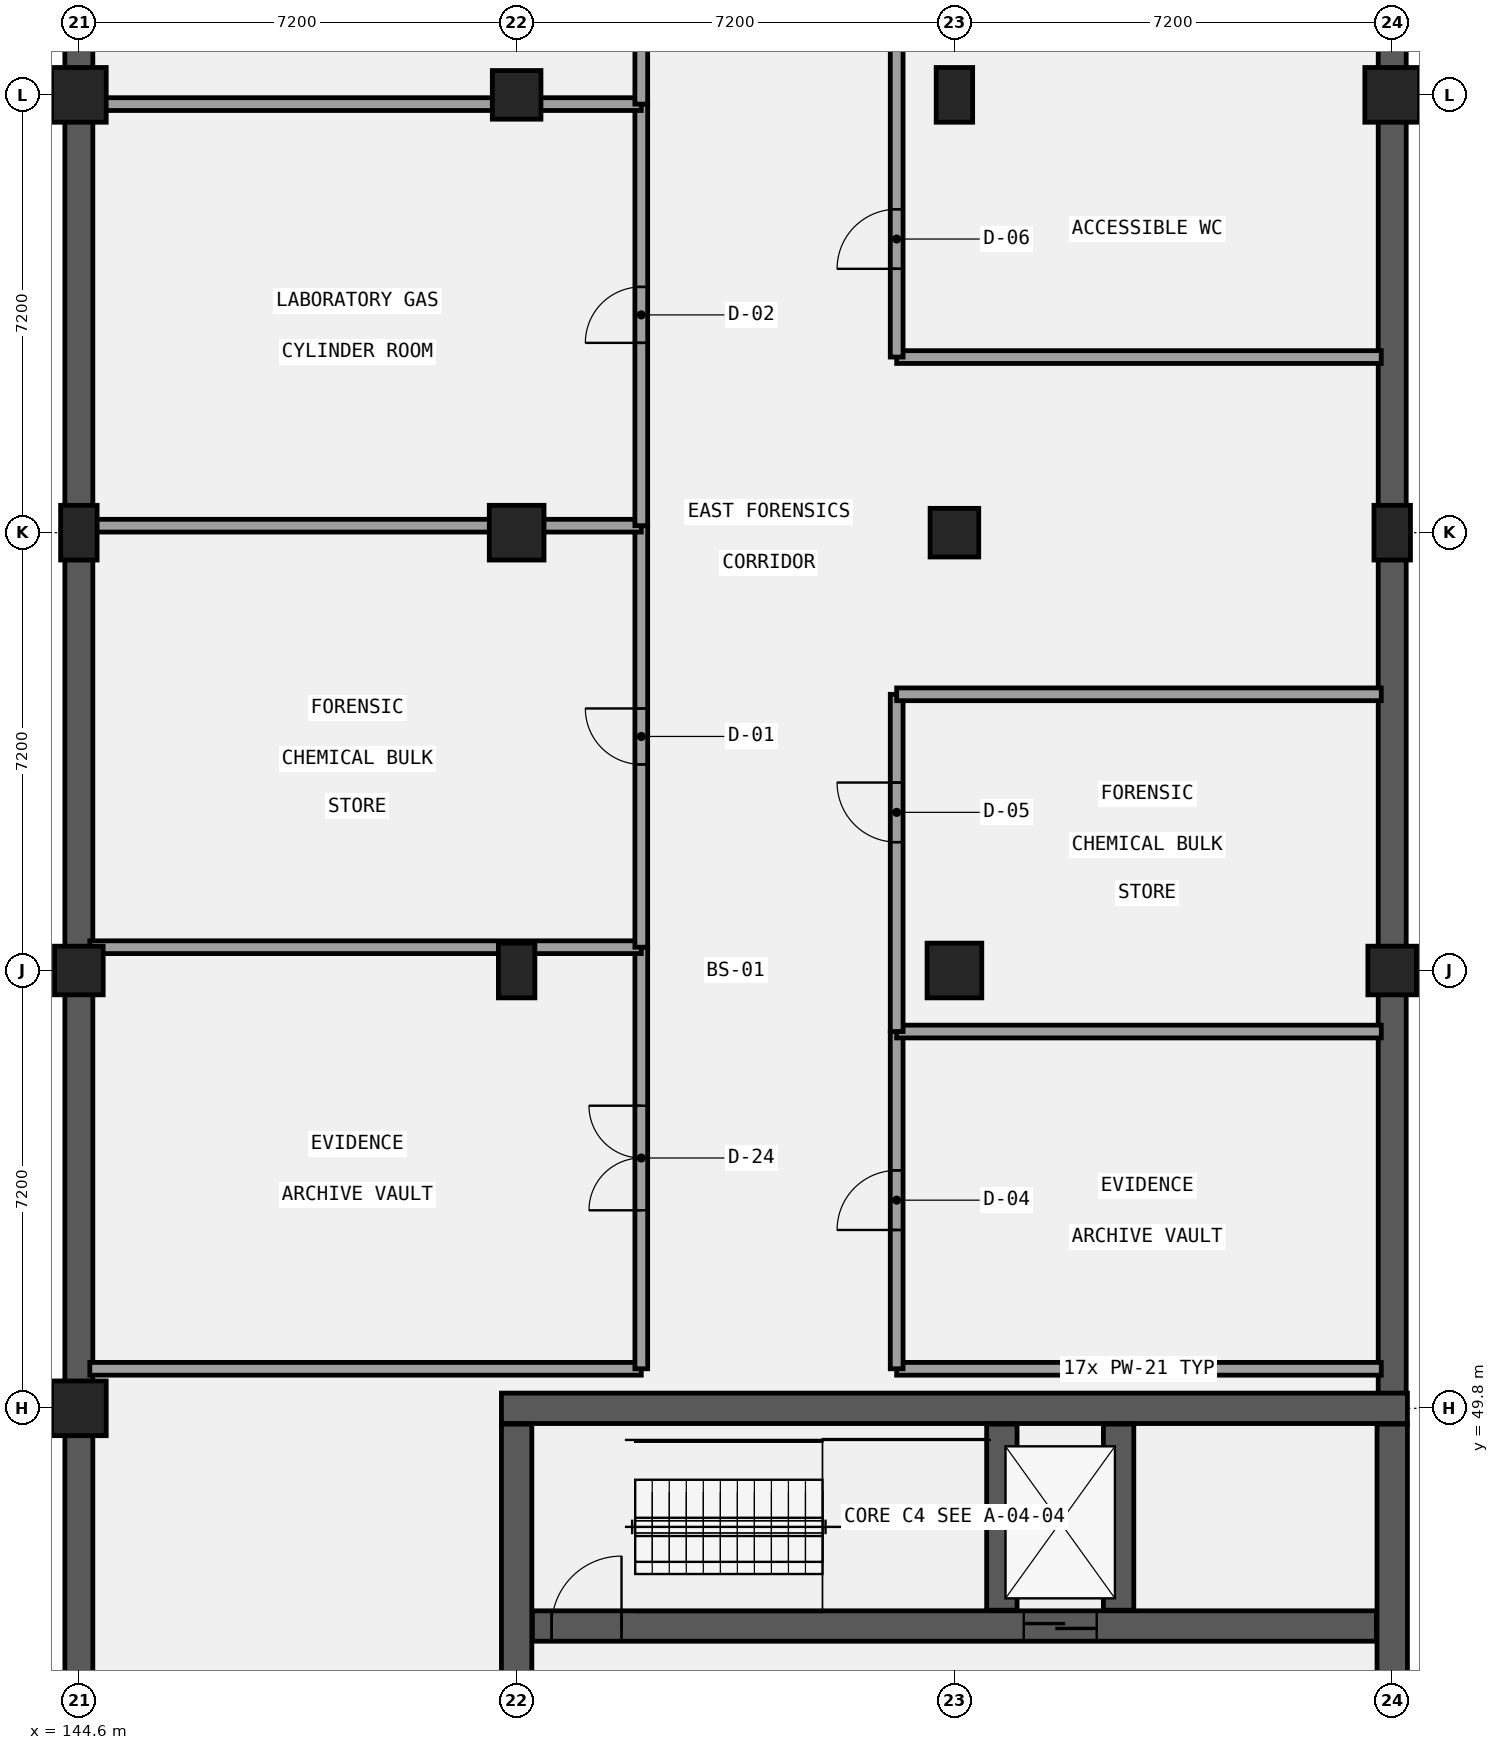
"""IFC4 building model, lengths in metres.
Left out: names, types, materials, properties, quantities, classifications, styles, units other than length and angle.
Written with IfcOpenShell. Run it as: python <this file> out.ifc"""

import sys

from ifc_helpers import new_model, si_unit, direction, frame, frame_2d, origin, origin_2d, place, context, subcontext, project, spatial, rectangle, extrude, element, fill, save


model = new_model("IFC4")
c1 = context("Model", 3, precision=1e-05, world=origin(), true_north=direction((0.0, 1.0)))
c2 = subcontext(c1, "Body", "Model", "MODEL_VIEW")
j1 = project(units=[si_unit("LENGTHUNIT", "METRE"), si_unit("PLANEANGLEUNIT", "RADIAN")], contexts=[c1])
p1 = place(None, origin())
s1 = spatial("IfcSite", under=j1, at=p1, CompositionType="ELEMENT")
p2 = place(p1, origin())
s2 = spatial("IfcBuilding", under=s1, at=p2, CompositionType="ELEMENT")
p3 = place(p2, frame((0.0, 0.0, -8.4)))
s3 = spatial("IfcBuildingStorey", under=s2, at=p3, CompositionType="ELEMENT", Elevation=-8.4)
p4 = place(p3, frame((166.2, 78.38, 0.0), z_axis=(0.0, 0.0, 1.0), x_axis=(0.0, -1.0, 0.0)))
e1 = element("IfcWall", 1, at=p4, inside=s3, PredefinedType="USERDEFINED", context=c2, shape_type="SweptSolid", body=[
    extrude(rectangle(XDim=28.35, YDim=0.46, at=frame_2d((14.175, 0.0))), origin(), (0.0, 0.0, 1.0), 2.9),
])
p5 = place(p3, frame((144.6, 35.62, 0.0), z_axis=(0.0, 0.0, 1.0), x_axis=(0.0, 1.0, 0.0)))
e2 = element("IfcWall", 2, at=p5, inside=s3, PredefinedType="USERDEFINED", context=c2, shape_type="SweptSolid", body=[
    extrude(rectangle(XDim=42.76, YDim=0.46, at=frame_2d((21.38, 0.0))), origin(), (0.0, 0.0, 1.0), 3.05),
])
p6 = place(p3, frame((151.55, 49.8, 0.0), z_axis=(0.0, 0.0, 1.0), x_axis=(1.0, 0.0, 0.0)))
e3 = element("IfcWall", 3, at=p6, inside=s3, PredefinedType="SHEAR", context=c2, shape_type="SweptSolid", body=[
    extrude(rectangle(XDim=14.9, YDim=0.5, at=frame_2d((7.45, 0.0))), origin(), (0.0, 0.0, 1.0), 4.2),
])
for number, where, z_axis, x_axis in (
    (4, (151.8, 42.86, 0.0), (0.0, 0.0, 1.0), (0.0, 1.0, 0.0)),
    (5, (166.2, 42.86, 0.0), (0.0, 0.0, 1.0), (0.0, 1.0, 0.0)),
):
    element("IfcWall", number, at=place(p3, frame(where, z_axis=z_axis, x_axis=x_axis)), inside=s3, PredefinedType="SHEAR", context=c2, shape_type="SweptSolid", body=[
        extrude(rectangle(XDim=6.68, YDim=0.5, at=frame_2d((3.34, 0.0))), origin(), (0.0, 0.0, 1.0), 4.2),
    ])
p7 = place(p3, frame((152.06, 46.22, 0.0), z_axis=(0.0, 0.0, 1.0), x_axis=(1.0, 0.0, 0.0)))
e6 = element("IfcWall", 6, at=p7, inside=s3, PredefinedType="SHEAR", context=c2, shape_type="SweptSolid", body=[
    extrude(rectangle(XDim=13.88, YDim=0.5, at=frame_2d((6.94, 0.0))), origin(), (0.0, 0.0, 1.0), 4.2),
])
p8 = place(p7, frame((8.08, 0.0, 0.0)))
e7 = element("IfcOpeningElement", 7, at=p8, cuts=e6, PredefinedType="OPENING", context=c2, shape_type="SweptSolid", body=[
    extrude(rectangle(XDim=1.2, YDim=2.15, at=frame_2d((0.6, 1.075))), frame((0.0, 0.26, 0.0), z_axis=(0.0, -1.0, 0.0), x_axis=(1.0, 0.0, 0.0)), (0.0, 0.0, 1.0), 0.52),
])
p9 = place(p7, frame((0.315, 0.0, 0.0)))
e8 = element("IfcOpeningElement", 8, at=p9, cuts=e6, PredefinedType="OPENING", context=c2, shape_type="SweptSolid", body=[
    extrude(rectangle(XDim=1.15, YDim=2.15, at=frame_2d((0.575, 1.075))), frame((0.0, 0.26, 0.0), z_axis=(0.0, -1.0, 0.0), x_axis=(1.0, 0.0, 0.0)), (0.0, 0.0, 1.0), 0.52),
])
for number, where, z_axis, x_axis in (
    (9, (159.78, 46.48, 0.0), (0.0, 0.0, 1.0), (0.0, 1.0, 0.0)),
    (10, (161.7, 46.48, 0.0), (0.0, 0.0, 1.0), (0.0, 1.0, 0.0)),
):
    element("IfcWall", number, at=place(p3, frame(where, z_axis=z_axis, x_axis=x_axis)), inside=s3, PredefinedType="SHEAR", context=c2, shape_type="SweptSolid", body=[
        extrude(rectangle(XDim=3.06, YDim=0.5, at=frame_2d((1.53, 0.0))), origin(), (0.0, 0.0, 1.0), 4.2),
    ])
p10 = place(p3, frame((144.6, 49.8, 0.0), z_axis=(0.0, 0.0, 1.0), x_axis=(1.0, 0.0, 0.0)))
e11 = element("IfcColumn", 11, at=p10, inside=s3, PredefinedType="COLUMN", context=c2, shape_type="SweptSolid", body=[
    extrude(rectangle(XDim=0.9, YDim=0.9, at=origin_2d()), origin(), (0.0, 0.0, 1.0), 4.2),
])
p11 = place(p3, frame((144.6, 57.0, 0.0), z_axis=(0.0, 0.0, 1.0), x_axis=(1.0, 0.0, 0.0)))
e12 = element("IfcColumn", 12, at=p11, inside=s3, PredefinedType="COLUMN", context=c2, shape_type="SweptSolid", body=[
    extrude(rectangle(XDim=0.8, YDim=0.8, at=origin_2d()), origin(), (0.0, 0.0, 1.0), 4.2),
])
p12 = place(p3, frame((144.6, 64.2, 0.0), z_axis=(0.0, 0.0, 1.0), x_axis=(1.0, 0.0, 0.0)))
e13 = element("IfcColumn", 13, at=p12, inside=s3, PredefinedType="COLUMN", context=c2, shape_type="SweptSolid", body=[
    extrude(rectangle(XDim=0.6, YDim=0.9, at=origin_2d()), origin(), (0.0, 0.0, 1.0), 4.2),
])
p13 = place(p3, frame((144.6, 71.4, 0.0), z_axis=(0.0, 0.0, 1.0), x_axis=(1.0, 0.0, 0.0)))
e14 = element("IfcColumn", 14, at=p13, inside=s3, PredefinedType="COLUMN", context=c2, shape_type="SweptSolid", body=[
    extrude(rectangle(XDim=0.9, YDim=0.9, at=origin_2d()), origin(), (0.0, 0.0, 1.0), 4.2),
])
p14 = place(p3, frame((151.8, 57.0, 0.0), z_axis=(0.0, 0.0, 1.0), x_axis=(1.0, 0.0, 0.0)))
e15 = element("IfcColumn", 15, at=p14, inside=s3, PredefinedType="COLUMN", context=c2, shape_type="SweptSolid", body=[
    extrude(rectangle(XDim=0.6, YDim=0.9, at=origin_2d()), origin(), (0.0, 0.0, 1.0), 4.2),
])
p15 = place(p3, frame((151.8, 64.2, 0.0), z_axis=(0.0, 0.0, 1.0), x_axis=(1.0, 0.0, 0.0)))
e16 = element("IfcColumn", 16, at=p15, inside=s3, PredefinedType="COLUMN", context=c2, shape_type="SweptSolid", body=[
    extrude(rectangle(XDim=0.9, YDim=0.9, at=origin_2d()), origin(), (0.0, 0.0, 1.0), 4.2),
])
p16 = place(p3, frame((151.8, 71.4, 0.0), z_axis=(0.0, 0.0, 1.0), x_axis=(1.0, 0.0, 0.0)))
e17 = element("IfcColumn", 17, at=p16, inside=s3, PredefinedType="COLUMN", context=c2, shape_type="SweptSolid", body=[
    extrude(rectangle(XDim=0.8, YDim=0.8, at=origin_2d()), origin(), (0.0, 0.0, 1.0), 4.2),
])
p17 = place(p3, frame((159.0, 57.0, 0.0), z_axis=(0.0, 0.0, 1.0), x_axis=(1.0, 0.0, 0.0)))
e18 = element("IfcColumn", 18, at=p17, inside=s3, PredefinedType="COLUMN", context=c2, shape_type="SweptSolid", body=[
    extrude(rectangle(XDim=0.9, YDim=0.9, at=origin_2d()), origin(), (0.0, 0.0, 1.0), 4.2),
])
p18 = place(p3, frame((159.0, 64.2, 0.0), z_axis=(0.0, 0.0, 1.0), x_axis=(1.0, 0.0, 0.0)))
e19 = element("IfcColumn", 19, at=p18, inside=s3, PredefinedType="COLUMN", context=c2, shape_type="SweptSolid", body=[
    extrude(rectangle(XDim=0.8, YDim=0.8, at=origin_2d()), origin(), (0.0, 0.0, 1.0), 4.2),
])
p19 = place(p3, frame((159.0, 71.4, 0.0), z_axis=(0.0, 0.0, 1.0), x_axis=(1.0, 0.0, 0.0)))
e20 = element("IfcColumn", 20, at=p19, inside=s3, PredefinedType="COLUMN", context=c2, shape_type="SweptSolid", body=[
    extrude(rectangle(XDim=0.6, YDim=0.9, at=origin_2d()), origin(), (0.0, 0.0, 1.0), 4.2),
])
p20 = place(p3, frame((166.2, 57.0, 0.0), z_axis=(0.0, 0.0, 1.0), x_axis=(1.0, 0.0, 0.0)))
e21 = element("IfcColumn", 21, at=p20, inside=s3, PredefinedType="COLUMN", context=c2, shape_type="SweptSolid", body=[
    extrude(rectangle(XDim=0.8, YDim=0.8, at=origin_2d()), origin(), (0.0, 0.0, 1.0), 4.2),
])
p21 = place(p3, frame((166.2, 64.2, 0.0), z_axis=(0.0, 0.0, 1.0), x_axis=(1.0, 0.0, 0.0)))
e22 = element("IfcColumn", 22, at=p21, inside=s3, PredefinedType="COLUMN", context=c2, shape_type="SweptSolid", body=[
    extrude(rectangle(XDim=0.6, YDim=0.9, at=origin_2d()), origin(), (0.0, 0.0, 1.0), 4.2),
])
p22 = place(p3, frame((166.2, 71.4, 0.0), z_axis=(0.0, 0.0, 1.0), x_axis=(1.0, 0.0, 0.0)))
e23 = element("IfcColumn", 23, at=p22, inside=s3, PredefinedType="COLUMN", context=c2, shape_type="SweptSolid", body=[
    extrude(rectangle(XDim=0.9, YDim=0.9, at=origin_2d()), origin(), (0.0, 0.0, 1.0), 4.2),
])
p23 = place(p3, frame((144.78, 50.45, 0.0), z_axis=(0.0, 0.0, 1.0), x_axis=(1.0, 0.0, 0.0)))
e24 = element("IfcWall", 24, at=p23, inside=s3, PredefinedType="PARTITIONING", context=c2, shape_type="SweptSolid", body=[
    extrude(rectangle(XDim=9.07, YDim=0.21, at=frame_2d((4.535, 0.0))), origin(), (0.0, 0.0, 1.0), 3.9),
])
p24 = place(p3, frame((153.85, 50.45, 0.0), z_axis=(0.0, 0.0, 1.0), x_axis=(0.0, 1.0, 0.0)))
e25 = element("IfcWall", 25, at=p24, inside=s3, PredefinedType="PARTITIONING", context=c2, shape_type="SweptSolid", body=[
    extrude(rectangle(XDim=6.933, YDim=0.21, at=frame_2d((3.467, 0.0))), origin(), (0.0, 0.0, 1.0), 3.9),
])
p25 = place(p24, frame((2.606, 0.0, 0.0)))
e26 = element("IfcOpeningElement", 26, at=p25, cuts=e25, PredefinedType="OPENING", context=c2, shape_type="SweptSolid", body=[
    extrude(rectangle(XDim=1.72, YDim=2.35, at=frame_2d((0.86, 1.175))), frame((0.0, 0.115, 0.0), z_axis=(0.0, -1.0, 0.0), x_axis=(1.0, 0.0, 0.0)), (0.0, 0.0, 1.0), 0.23),
])
p26 = place(p3, frame((144.78, 57.383, 0.0), z_axis=(0.0, 0.0, 1.0), x_axis=(1.0, 0.0, 0.0)))
e27 = element("IfcWall", 27, at=p26, inside=s3, PredefinedType="PARTITIONING", context=c2, shape_type="SweptSolid", body=[
    extrude(rectangle(XDim=9.07, YDim=0.21, at=frame_2d((4.535, 0.0))), origin(), (0.0, 0.0, 1.0), 3.9),
])
p27 = place(p3, frame((153.85, 57.383, 0.0), z_axis=(0.0, 0.0, 1.0), x_axis=(0.0, 1.0, 0.0)))
e28 = element("IfcWall", 28, at=p27, inside=s3, PredefinedType="PARTITIONING", context=c2, shape_type="SweptSolid", body=[
    extrude(rectangle(XDim=6.932, YDim=0.21, at=frame_2d((3.466, 0.0))), origin(), (0.0, 0.0, 1.0), 3.9),
])
p28 = place(p27, frame((3.006, 0.0, 0.0)))
e29 = element("IfcOpeningElement", 29, at=p28, cuts=e28, PredefinedType="OPENING", context=c2, shape_type="SweptSolid", body=[
    extrude(rectangle(XDim=0.92, YDim=2.1, at=frame_2d((0.46, 1.05))), frame((0.0, 0.115, 0.0), z_axis=(0.0, -1.0, 0.0), x_axis=(1.0, 0.0, 0.0)), (0.0, 0.0, 1.0), 0.23),
])
p29 = place(p3, frame((144.78, 64.315, 0.0), z_axis=(0.0, 0.0, 1.0), x_axis=(1.0, 0.0, 0.0)))
e30 = element("IfcWall", 30, at=p29, inside=s3, PredefinedType="PARTITIONING", context=c2, shape_type="SweptSolid", body=[
    extrude(rectangle(XDim=9.07, YDim=0.21, at=frame_2d((4.535, 0.0))), origin(), (0.0, 0.0, 1.0), 3.15),
])
p30 = place(p3, frame((153.85, 64.315, 0.0), z_axis=(0.0, 0.0, 1.0), x_axis=(0.0, 1.0, 0.0)))
e31 = element("IfcWall", 31, at=p30, inside=s3, PredefinedType="PARTITIONING", context=c2, shape_type="SweptSolid", body=[
    extrude(rectangle(XDim=6.933, YDim=0.21, at=frame_2d((3.467, 0.0))), origin(), (0.0, 0.0, 1.0), 3.9),
])
p31 = place(p30, frame((3.007, 0.0, 0.0)))
e32 = element("IfcOpeningElement", 32, at=p31, cuts=e31, PredefinedType="OPENING", context=c2, shape_type="SweptSolid", body=[
    extrude(rectangle(XDim=0.92, YDim=2.22, at=frame_2d((0.46, 1.11))), frame((0.0, 0.115, 0.0), z_axis=(0.0, -1.0, 0.0), x_axis=(1.0, 0.0, 0.0)), (0.0, 0.0, 1.0), 0.23),
])
p32 = place(p3, frame((144.78, 71.248, 0.0), z_axis=(0.0, 0.0, 1.0), x_axis=(1.0, 0.0, 0.0)))
e33 = element("IfcWall", 33, at=p32, inside=s3, PredefinedType="PARTITIONING", context=c2, shape_type="SweptSolid", body=[
    extrude(rectangle(XDim=9.07, YDim=0.21, at=frame_2d((4.535, 0.0))), origin(), (0.0, 0.0, 1.0), 3.15),
])
p33 = place(p3, frame((153.85, 71.248, 0.0), z_axis=(0.0, 0.0, 1.0), x_axis=(0.0, 1.0, 0.0)))
e34 = element("IfcWall", 34, at=p33, inside=s3, PredefinedType="PARTITIONING", context=c2, shape_type="SweptSolid", body=[
    extrude(rectangle(XDim=6.932, YDim=0.21, at=frame_2d((3.466, 0.0))), origin(), (0.0, 0.0, 1.0), 3.9),
])
p34 = place(p33, frame((3.006, 0.0, 0.0)))
e35 = element("IfcOpeningElement", 35, at=p34, cuts=e34, PredefinedType="OPENING", context=c2, shape_type="SweptSolid", body=[
    extrude(rectangle(XDim=0.92, YDim=2.35, at=frame_2d((0.46, 1.175))), frame((0.0, 0.115, 0.0), z_axis=(0.0, -1.0, 0.0), x_axis=(1.0, 0.0, 0.0)), (0.0, 0.0, 1.0), 0.23),
])
p35 = place(p3, frame((158.05, 50.45, 0.0), z_axis=(0.0, 0.0, 1.0), x_axis=(1.0, 0.0, 0.0)))
e36 = element("IfcWall", 36, at=p35, inside=s3, PredefinedType="PARTITIONING", context=c2, shape_type="SweptSolid", body=[
    extrude(rectangle(XDim=7.97, YDim=0.21, at=frame_2d((3.985, 0.0))), origin(), (0.0, 0.0, 1.0), 3.9),
])
p36 = place(p3, frame((158.05, 50.45, 0.0), z_axis=(0.0, 0.0, 1.0), x_axis=(0.0, 1.0, 0.0)))
e37 = element("IfcWall", 37, at=p36, inside=s3, PredefinedType="PARTITIONING", context=c2, shape_type="SweptSolid", body=[
    extrude(rectangle(XDim=5.546, YDim=0.21, at=frame_2d((2.773, 0.0))), origin(), (0.0, 0.0, 1.0), 3.9),
])
p37 = place(p36, frame((2.283, 0.0, 0.0)))
e38 = element("IfcOpeningElement", 38, at=p37, cuts=e37, PredefinedType="OPENING", context=c2, shape_type="SweptSolid", body=[
    extrude(rectangle(XDim=0.98, YDim=2.1, at=frame_2d((0.49, 1.05))), frame((0.0, 0.115, 0.0), z_axis=(0.0, -1.0, 0.0), x_axis=(1.0, 0.0, 0.0)), (0.0, 0.0, 1.0), 0.23),
])
p38 = place(p3, frame((158.05, 55.996, 0.0), z_axis=(0.0, 0.0, 1.0), x_axis=(1.0, 0.0, 0.0)))
e39 = element("IfcWall", 39, at=p38, inside=s3, PredefinedType="PARTITIONING", context=c2, shape_type="SweptSolid", body=[
    extrude(rectangle(XDim=7.97, YDim=0.21, at=frame_2d((3.985, 0.0))), origin(), (0.0, 0.0, 1.0), 3.9),
])
p39 = place(p3, frame((158.05, 55.996, 0.0), z_axis=(0.0, 0.0, 1.0), x_axis=(0.0, 1.0, 0.0)))
e40 = element("IfcWall", 40, at=p39, inside=s3, PredefinedType="PARTITIONING", context=c2, shape_type="SweptSolid", body=[
    extrude(rectangle(XDim=5.546, YDim=0.21, at=frame_2d((2.773, 0.0))), origin(), (0.0, 0.0, 1.0), 3.9),
])
p40 = place(p39, frame((3.115, 0.0, 0.0)))
e41 = element("IfcOpeningElement", 41, at=p40, cuts=e40, PredefinedType="OPENING", context=c2, shape_type="SweptSolid", body=[
    extrude(rectangle(XDim=0.98, YDim=2.22, at=frame_2d((0.49, 1.11))), frame((0.0, 0.115, 0.0), z_axis=(0.0, -1.0, 0.0), x_axis=(1.0, 0.0, 0.0)), (0.0, 0.0, 1.0), 0.23),
])
for number, where, z_axis, x_axis in (
    (42, (158.05, 61.542, 0.0), (0.0, 0.0, 1.0), (1.0, 0.0, 0.0)),
    (43, (158.05, 67.088, 0.0), (0.0, 0.0, 1.0), (1.0, 0.0, 0.0)),
):
    element("IfcWall", number, at=place(p3, frame(where, z_axis=z_axis, x_axis=x_axis)), inside=s3, PredefinedType="PARTITIONING", context=c2, shape_type="SweptSolid", body=[
        extrude(rectangle(XDim=7.97, YDim=0.21, at=frame_2d((3.985, 0.0))), origin(), (0.0, 0.0, 1.0), 3.9),
    ])
p41 = place(p3, frame((158.05, 67.088, 0.0), z_axis=(0.0, 0.0, 1.0), x_axis=(0.0, 1.0, 0.0)))
e44 = element("IfcWall", 44, at=p41, inside=s3, PredefinedType="PARTITIONING", context=c2, shape_type="SweptSolid", body=[
    extrude(rectangle(XDim=5.546, YDim=0.21, at=frame_2d((2.773, 0.0))), origin(), (0.0, 0.0, 1.0), 3.9),
])
p42 = place(p41, frame((1.451, 0.0, 0.0)))
e45 = element("IfcOpeningElement", 45, at=p42, cuts=e44, PredefinedType="OPENING", context=c2, shape_type="SweptSolid", body=[
    extrude(rectangle(XDim=0.98, YDim=2.35, at=frame_2d((0.49, 1.175))), frame((0.0, 0.115, 0.0), z_axis=(0.0, -1.0, 0.0), x_axis=(1.0, 0.0, 0.0)), (0.0, 0.0, 1.0), 0.23),
])
p43 = place(p8, frame((1.2, 0.0, 0.0), z_axis=(0.0, 0.0, 1.0), x_axis=(-1.0, 0.0, 0.0)))
e46 = element("IfcDoor", 46, at=p43, inside=s3, OperationType="DOUBLE_DOOR_SLIDING", PredefinedType="DOOR", context=c2, shape_type="SweptSolid", body=[
    extrude(rectangle(XDim=1.2, YDim=2.15, at=frame_2d((0.6, 1.075))), frame((0.0, 0.025, 0.0), z_axis=(0.0, -1.0, 0.0), x_axis=(1.0, 0.0, 0.0)), (0.0, 0.0, 1.0), 0.05),
])
fill(e7, e46)
p44 = place(p9, origin())
e47 = element("IfcDoor", 47, at=p44, inside=s3, OperationType="SINGLE_SWING_RIGHT", PredefinedType="DOOR", context=c2, shape_type="SweptSolid", body=[
    extrude(rectangle(XDim=1.15, YDim=2.15, at=frame_2d((0.575, 1.075))), frame((0.0, 0.025, 0.0), z_axis=(0.0, -1.0, 0.0), x_axis=(1.0, 0.0, 0.0)), (0.0, 0.0, 1.0), 0.05),
])
fill(e8, e47)
p45 = place(p25, frame((1.72, 0.0, 0.0), z_axis=(0.0, 0.0, 1.0), x_axis=(-1.0, 0.0, 0.0)))
e48 = element("IfcDoor", 48, at=p45, inside=s3, OperationType="DOUBLE_DOOR_SINGLE_SWING", PredefinedType="DOOR", context=c2, shape_type="SweptSolid", body=[
    extrude(rectangle(XDim=1.72, YDim=2.35, at=frame_2d((0.86, 1.175))), frame((0.0, 0.025, 0.0), z_axis=(0.0, -1.0, 0.0), x_axis=(1.0, 0.0, 0.0)), (0.0, 0.0, 1.0), 0.05),
])
fill(e26, e48)
p46 = place(p28, frame((0.92, 0.0, 0.0), z_axis=(0.0, 0.0, 1.0), x_axis=(-1.0, 0.0, 0.0)))
e49 = element("IfcDoor", 49, at=p46, inside=s3, OperationType="SINGLE_SWING_RIGHT", PredefinedType="DOOR", context=c2, shape_type="SweptSolid", body=[
    extrude(rectangle(XDim=0.92, YDim=2.1, at=frame_2d((0.46, 1.05))), frame((0.0, 0.025, 0.0), z_axis=(0.0, -1.0, 0.0), x_axis=(1.0, 0.0, 0.0)), (0.0, 0.0, 1.0), 0.05),
])
fill(e29, e49)
p47 = place(p31, frame((0.92, 0.0, 0.0), z_axis=(0.0, 0.0, 1.0), x_axis=(-1.0, 0.0, 0.0)))
e50 = element("IfcDoor", 50, at=p47, inside=s3, OperationType="SINGLE_SWING_LEFT", PredefinedType="DOOR", context=c2, shape_type="SweptSolid", body=[
    extrude(rectangle(XDim=0.92, YDim=2.22, at=frame_2d((0.46, 1.11))), frame((0.0, 0.025, 0.0), z_axis=(0.0, -1.0, 0.0), x_axis=(1.0, 0.0, 0.0)), (0.0, 0.0, 1.0), 0.05),
])
fill(e32, e50)
p48 = place(p37, origin())
e51 = element("IfcDoor", 51, at=p48, inside=s3, OperationType="SINGLE_SWING_LEFT", PredefinedType="DOOR", context=c2, shape_type="SweptSolid", body=[
    extrude(rectangle(XDim=0.98, YDim=2.1, at=frame_2d((0.49, 1.05))), frame((0.0, 0.025, 0.0), z_axis=(0.0, -1.0, 0.0), x_axis=(1.0, 0.0, 0.0)), (0.0, 0.0, 1.0), 0.05),
])
fill(e38, e51)
p49 = place(p40, origin())
e52 = element("IfcDoor", 52, at=p49, inside=s3, OperationType="SINGLE_SWING_RIGHT", PredefinedType="DOOR", context=c2, shape_type="SweptSolid", body=[
    extrude(rectangle(XDim=0.98, YDim=2.22, at=frame_2d((0.49, 1.11))), frame((0.0, 0.025, 0.0), z_axis=(0.0, -1.0, 0.0), x_axis=(1.0, 0.0, 0.0)), (0.0, 0.0, 1.0), 0.05),
])
fill(e41, e52)
p50 = place(p42, origin())
e53 = element("IfcDoor", 53, at=p50, inside=s3, OperationType="SINGLE_SWING_LEFT", PredefinedType="DOOR", context=c2, shape_type="SweptSolid", body=[
    extrude(rectangle(XDim=0.98, YDim=2.35, at=frame_2d((0.49, 1.175))), frame((0.0, 0.025, 0.0), z_axis=(0.0, -1.0, 0.0), x_axis=(1.0, 0.0, 0.0)), (0.0, 0.0, 1.0), 0.05),
])
fill(e45, e53)
save(model, sys.argv[1])
